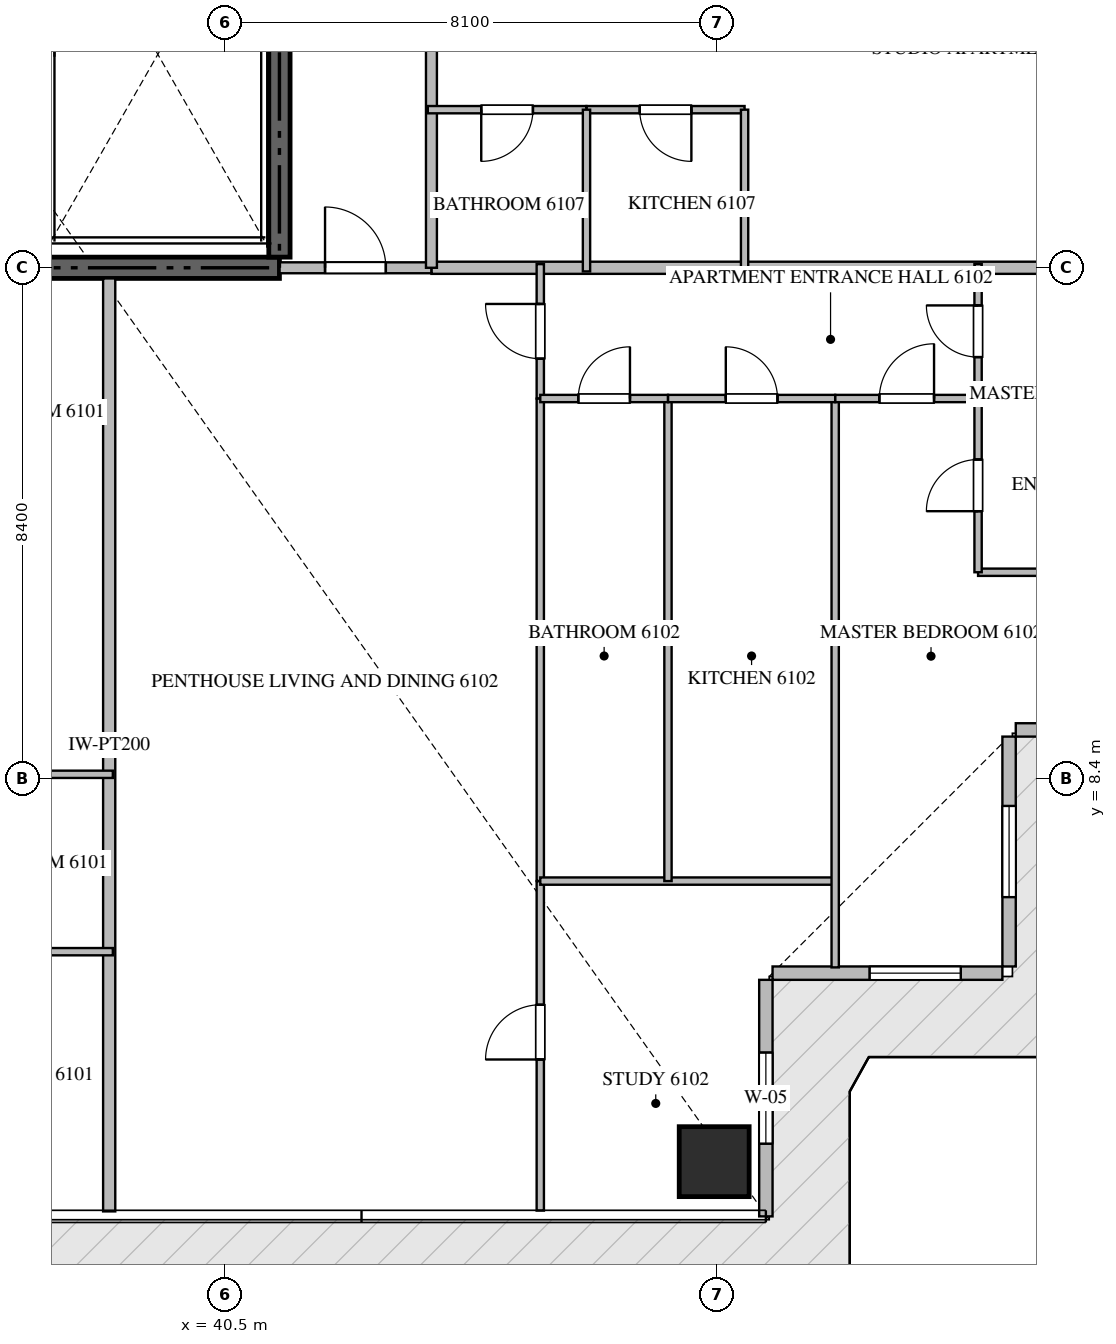
"""IFC4 building model, lengths in metres.
Left out: names, types, materials, properties, quantities, classifications, styles, units other than length and angle.
Written with IfcOpenShell. Run it as: python <this file> out.ifc"""

import sys

from ifc_helpers import new_model, si_unit, direction, frame, frame_2d, origin, origin_2d, place, context, subcontext, project, spatial, rectangle, extrude, source, transform, mapped, element, fill, save


model = new_model("IFC4")
c1 = context("Model", 3, precision=1e-05, world=origin(), true_north=direction((0.0, 1.0)))
c2 = subcontext(c1, "Body", "Model", "MODEL_VIEW")
j1 = project(units=[si_unit("LENGTHUNIT", "METRE"), si_unit("PLANEANGLEUNIT", "RADIAN")], contexts=[c1])
p1 = place(None, origin())
s1 = spatial("IfcSite", under=j1, at=p1, CompositionType="ELEMENT")
p2 = place(p1, origin())
s2 = spatial("IfcBuilding", under=s1, at=p2, CompositionType="ELEMENT")
p3 = place(p2, frame((0.0, 0.0, 245.1)))
s3 = spatial("IfcBuildingStorey", under=s2, at=p3, CompositionType="ELEMENT", Elevation=245.1)
p4 = place(p3, frame((23.4, 16.8, -0.26), z_axis=(0.0, 0.0, 1.0), x_axis=(1.0, 0.0, 0.0)))
e1 = element("IfcWall", 1, at=p4, inside=s3, PredefinedType="SHEAR", context=c2, shape_type="SweptSolid", body=[
    extrude(rectangle(XDim=18.0, YDim=0.35, at=frame_2d((9.0, 0.0))), origin(), (0.0, 0.0, 1.0), 3.848),
])
p5 = place(p3, frame((41.4, 16.975, -0.26), z_axis=(0.0, 0.0, 1.0), x_axis=(0.0, 1.0, 0.0)))
e2 = element("IfcWall", 2, at=p5, inside=s3, PredefinedType="SHEAR", context=c2, shape_type="SweptSolid", body=[
    extrude(rectangle(XDim=8.375, YDim=0.35, at=frame_2d((4.188, 0.0))), origin(), (0.0, 0.0, 1.0), 3.848),
])
m1 = source(origin(), c2, "Body", "SweptSolid", [
    extrude(rectangle(XDim=1.15, YDim=1.15, at=origin_2d()), origin(), (0.0, 0.0, 1.0), 3.85),
])
p6 = place(p3, frame((48.55, 2.1, -0.26), z_axis=(0.0, 0.0, 1.0), x_axis=(1.0, 0.0, 0.0)))
e3 = element("IfcColumn", 3, at=p6, inside=s3, PredefinedType="COLUMN", context=c2, shape_type="MappedRepresentation", body=[
    mapped(m1, transform((0.0, 0.0, 0.0), scale=1.0)),
])
p7 = place(p3, frame((49.4, 1.2, 0.0), z_axis=(0.0, 0.0, 1.0), x_axis=(0.0, 1.0, 0.0)))
e4 = element("IfcWall", 4, at=p7, inside=s3, PredefinedType="ELEMENTEDWALL", context=c2, shape_type="SweptSolid", body=[
    extrude(rectangle(XDim=3.89, YDim=0.22, at=frame_2d((1.945, 0.0))), origin(), (0.0, 0.0, 1.0), 3.575),
])
p8 = place(p7, frame((1.195, 0.0, 0.65)))
e5 = element("IfcOpeningElement", 5, at=p8, cuts=e4, PredefinedType="OPENING", context=c2, shape_type="SweptSolid", body=[
    extrude(rectangle(XDim=1.5, YDim=2.25, at=frame_2d((0.75, 1.125))), frame((0.0, 0.12, 0.0), z_axis=(0.0, -1.0, 0.0), x_axis=(1.0, 0.0, 0.0)), (0.0, 0.0, 1.0), 0.24),
])
p9 = place(p3, frame((49.51, 5.2, 0.0), z_axis=(0.0, 0.0, 1.0), x_axis=(1.0, 0.0, 0.0)))
e6 = element("IfcWall", 6, at=p9, inside=s3, PredefinedType="ELEMENTEDWALL", context=c2, shape_type="SweptSolid", body=[
    extrude(rectangle(XDim=3.78, YDim=0.22, at=frame_2d((1.89, 0.0))), origin(), (0.0, 0.0, 1.0), 3.575),
])
p10 = place(p9, frame((1.596, 0.0, 0.65)))
e7 = element("IfcOpeningElement", 7, at=p10, cuts=e6, PredefinedType="OPENING", context=c2, shape_type="SweptSolid", body=[
    extrude(rectangle(XDim=1.5, YDim=2.25, at=frame_2d((0.75, 1.125))), frame((0.0, 0.12, 0.0), z_axis=(0.0, -1.0, 0.0), x_axis=(1.0, 0.0, 0.0)), (0.0, 0.0, 1.0), 0.24),
])
p11 = place(p3, frame((53.4, 5.31, 0.0), z_axis=(0.0, 0.0, 1.0), x_axis=(0.0, 1.0, 0.0)))
e8 = element("IfcWall", 8, at=p11, inside=s3, PredefinedType="ELEMENTEDWALL", context=c2, shape_type="SweptSolid", body=[
    extrude(rectangle(XDim=3.78, YDim=0.22, at=frame_2d((1.89, 0.0))), origin(), (0.0, 0.0, 1.0), 3.575),
])
p12 = place(p11, frame((1.14, 0.0, 0.65)))
e9 = element("IfcOpeningElement", 9, at=p12, cuts=e8, PredefinedType="OPENING", context=c2, shape_type="SweptSolid", body=[
    extrude(rectangle(XDim=1.5, YDim=2.25, at=frame_2d((0.75, 1.125))), frame((0.0, 0.12, 0.0), z_axis=(0.0, -1.0, 0.0), x_axis=(1.0, 0.0, 0.0)), (0.0, 0.0, 1.0), 0.24),
])
p13 = place(p3, frame((53.51, 9.2, 0.0), z_axis=(0.0, 0.0, 1.0), x_axis=(1.0, 0.0, 0.0)))
e10 = element("IfcWall", 10, at=p13, inside=s3, PredefinedType="ELEMENTEDWALL", context=c2, shape_type="SweptSolid", body=[
    extrude(rectangle(XDim=3.89, YDim=0.22, at=frame_2d((1.945, 0.0))), origin(), (0.0, 0.0, 1.0), 3.575),
])
p14 = place(p13, frame((1.195, 0.0, 0.65)))
e11 = element("IfcOpeningElement", 11, at=p14, cuts=e10, PredefinedType="OPENING", context=c2, shape_type="SweptSolid", body=[
    extrude(rectangle(XDim=1.5, YDim=2.25, at=frame_2d((0.75, 1.125))), frame((0.0, 0.12, 0.0), z_axis=(0.0, -1.0, 0.0), x_axis=(1.0, 0.0, 0.0)), (0.0, 0.0, 1.0), 0.24),
])
p15 = place(p3, frame((38.6, 1.282, 0.0), z_axis=(0.0, 0.0, 1.0), x_axis=(0.0, 1.0, 0.0)))
e12 = element("IfcWall", 12, at=p15, inside=s3, PredefinedType="PARTITIONING", context=c2, shape_type="SweptSolid", body=[
    extrude(rectangle(XDim=15.343, YDim=0.2, at=frame_2d((7.671, 0.0))), origin(), (0.0, 0.0, 1.0), 3.59),
])
p16 = place(p3, frame((43.9, 16.8, 0.0), z_axis=(0.0, 0.0, 1.0), x_axis=(1.0, 0.0, 0.0)))
e13 = element("IfcWall", 13, at=p16, inside=s3, PredefinedType="PARTITIONING", context=c2, shape_type="SweptSolid", body=[
    extrude(rectangle(XDim=13.418, YDim=0.2, at=frame_2d((6.709, 0.0))), origin(), (0.0, 0.0, 1.0), 3.59),
])
p17 = place(p3, frame((41.402, 16.8, 0.0), z_axis=(0.0, 0.0, 1.0), x_axis=(1.0, 0.0, 0.0)))
e14 = element("IfcWall", 14, at=p17, inside=s3, PredefinedType="PARTITIONING", context=c2, shape_type="SweptSolid", body=[
    extrude(rectangle(XDim=2.496, YDim=0.18, at=frame_2d((1.248, 0.0))), origin(), (0.0, 0.0, 1.0), 3.59),
])
p18 = place(p17, frame((0.748, 0.0, 0.0)))
e15 = element("IfcOpeningElement", 15, at=p18, cuts=e14, PredefinedType="OPENING", context=c2, shape_type="SweptSolid", body=[
    extrude(rectangle(XDim=1.0, YDim=2.15, at=frame_2d((0.5, 1.075))), frame((0.0, 0.1, 0.0), z_axis=(0.0, -1.0, 0.0), x_axis=(1.0, 0.0, 0.0)), (0.0, 0.0, 1.0), 0.2),
])
p19 = place(p3, frame((43.9, 16.8, 0.0), z_axis=(0.0, 0.0, 1.0), x_axis=(0.0, 1.0, 0.0)))
e16 = element("IfcWall", 16, at=p19, inside=s3, PredefinedType="PARTITIONING", context=c2, shape_type="SweptSolid", body=[
    extrude(rectangle(XDim=16.8, YDim=0.18, at=frame_2d((8.4, 0.0))), origin(), (0.0, 0.0, 1.0), 3.59),
])
p20 = place(p19, frame((4.503, 0.0, 0.0)))
e17 = element("IfcOpeningElement", 17, at=p20, cuts=e16, PredefinedType="OPENING", context=c2, shape_type="SweptSolid", body=[
    extrude(rectangle(XDim=1.0, YDim=2.15, at=frame_2d((0.5, 1.075))), frame((0.0, 0.1, 0.0), z_axis=(0.0, -1.0, 0.0), x_axis=(1.0, 0.0, 0.0)), (0.0, 0.0, 1.0), 0.2),
])
p21 = place(p19, frame((8.706, 0.0, 0.0)))
e18 = element("IfcOpeningElement", 18, at=p21, cuts=e16, PredefinedType="OPENING", context=c2, shape_type="SweptSolid", body=[
    extrude(rectangle(XDim=1.0, YDim=2.15, at=frame_2d((0.5, 1.075))), frame((0.0, 0.1, 0.0), z_axis=(0.0, -1.0, 0.0), x_axis=(1.0, 0.0, 0.0)), (0.0, 0.0, 1.0), 0.2),
])
for number, where, z_axis, x_axis in (
    (19, (33.8, 5.553, 0.0), (0.0, 0.0, 1.0), (1.0, 0.0, 0.0)),
    (20, (33.8, 8.47, 0.0), (0.0, 0.0, 1.0), (1.0, 0.0, 0.0)),
):
    element("IfcWall", number, at=place(p3, frame(where, z_axis=z_axis, x_axis=x_axis)), inside=s3, PredefinedType="PARTITIONING", context=c2, shape_type="SweptSolid", body=[
        extrude(rectangle(XDim=4.86, YDim=0.12, at=frame_2d((2.43, 0.0))), origin(), (0.0, 0.0, 1.0), 3.59),
    ])
p22 = place(p3, frame((45.69, 14.65, 0.0), z_axis=(0.0, 0.0, 1.0), x_axis=(0.0, 1.0, 0.0)))
e21 = element("IfcWall", 21, at=p22, inside=s3, PredefinedType="PARTITIONING", context=c2, shape_type="SweptSolid", body=[
    extrude(rectangle(XDim=2.21, YDim=0.12, at=frame_2d((1.105, 0.0))), origin(), (0.0, 0.0, 1.0), 3.59),
])
p23 = place(p22, frame((0.655, 0.0, 0.0)))
e22 = element("IfcOpeningElement", 22, at=p23, cuts=e21, PredefinedType="OPENING", context=c2, shape_type="SweptSolid", body=[
    extrude(rectangle(XDim=0.9, YDim=2.1, at=frame_2d((0.45, 1.05))), frame((0.0, 0.07, 0.0), z_axis=(0.0, -1.0, 0.0), x_axis=(1.0, 0.0, 0.0)), (0.0, 0.0, 1.0), 0.14),
])
p24 = place(p3, frame((45.69, 1.295, 0.0), z_axis=(0.0, 0.0, 1.0), x_axis=(0.0, 1.0, 0.0)))
e23 = element("IfcWall", 23, at=p24, inside=s3, PredefinedType="PARTITIONING", context=c2, shape_type="SweptSolid", body=[
    extrude(rectangle(XDim=5.419, YDim=0.12, at=frame_2d((2.709, 0.0))), origin(), (0.0, 0.0, 1.0), 3.59),
])
p25 = place(p24, frame((2.485, 0.0, 0.0)))
e24 = element("IfcOpeningElement", 24, at=p25, cuts=e23, PredefinedType="OPENING", context=c2, shape_type="SweptSolid", body=[
    extrude(rectangle(XDim=0.9, YDim=2.1, at=frame_2d((0.45, 1.05))), frame((0.0, 0.07, 0.0), z_axis=(0.0, -1.0, 0.0), x_axis=(1.0, 0.0, 0.0)), (0.0, 0.0, 1.0), 0.14),
])
p26 = place(p3, frame((45.69, 6.716, 0.0), z_axis=(0.0, 0.0, 1.0), x_axis=(0.0, 1.0, 0.0)))
e25 = element("IfcWall", 25, at=p26, inside=s3, PredefinedType="PARTITIONING", context=c2, shape_type="SweptSolid", body=[
    extrude(rectangle(XDim=7.932, YDim=0.12, at=frame_2d((3.966, 0.0))), origin(), (0.0, 0.0, 1.0), 3.59),
])
p27 = place(p3, frame((45.69, 6.714, 0.0), z_axis=(0.0, 0.0, 1.0), x_axis=(1.0, 0.0, 0.0)))
e26 = element("IfcWall", 26, at=p27, inside=s3, PredefinedType="PARTITIONING", context=c2, shape_type="SweptSolid", body=[
    extrude(rectangle(XDim=4.85, YDim=0.12, at=frame_2d((2.425, 0.0))), origin(), (0.0, 0.0, 1.0), 3.59),
])
p28 = place(p3, frame((50.54, 5.295, 0.0), z_axis=(0.0, 0.0, 1.0), x_axis=(0.0, 1.0, 0.0)))
e27 = element("IfcWall", 27, at=p28, inside=s3, PredefinedType="PARTITIONING", context=c2, shape_type="SweptSolid", body=[
    extrude(rectangle(XDim=9.355, YDim=0.12, at=frame_2d((4.677, 0.0))), origin(), (0.0, 0.0, 1.0), 3.59),
])
p29 = place(p3, frame((47.79, 6.714, 0.0), z_axis=(0.0, 0.0, 1.0), x_axis=(0.0, 1.0, 0.0)))
e28 = element("IfcWall", 28, at=p29, inside=s3, PredefinedType="PARTITIONING", context=c2, shape_type="SweptSolid", body=[
    extrude(rectangle(XDim=7.936, YDim=0.12, at=frame_2d((3.968, 0.0))), origin(), (0.0, 0.0, 1.0), 3.59),
])
p30 = place(p3, frame((45.69, 14.65, 0.0), z_axis=(0.0, 0.0, 1.0), x_axis=(1.0, 0.0, 0.0)))
e29 = element("IfcWall", 29, at=p30, inside=s3, PredefinedType="PARTITIONING", context=c2, shape_type="SweptSolid", body=[
    extrude(rectangle(XDim=2.1, YDim=0.12, at=frame_2d((1.05, 0.0))), origin(), (0.0, 0.0, 1.0), 3.59),
])
p31 = place(p30, frame((0.625, 0.0, 0.0)))
e30 = element("IfcOpeningElement", 30, at=p31, cuts=e29, PredefinedType="OPENING", context=c2, shape_type="SweptSolid", body=[
    extrude(rectangle(XDim=0.85, YDim=2.1, at=frame_2d((0.425, 1.05))), frame((0.0, 0.07, 0.0), z_axis=(0.0, -1.0, 0.0), x_axis=(1.0, 0.0, 0.0)), (0.0, 0.0, 1.0), 0.14),
])
p32 = place(p3, frame((47.792, 14.65, 0.0), z_axis=(0.0, 0.0, 1.0), x_axis=(1.0, 0.0, 0.0)))
e31 = element("IfcWall", 31, at=p32, inside=s3, PredefinedType="PARTITIONING", context=c2, shape_type="SweptSolid", body=[
    extrude(rectangle(XDim=2.748, YDim=0.12, at=frame_2d((1.374, 0.0))), origin(), (0.0, 0.0, 1.0), 3.59),
])
p33 = place(p32, frame((0.949, 0.0, 0.0)))
e32 = element("IfcOpeningElement", 32, at=p33, cuts=e31, PredefinedType="OPENING", context=c2, shape_type="SweptSolid", body=[
    extrude(rectangle(XDim=0.85, YDim=2.1, at=frame_2d((0.425, 1.05))), frame((0.0, 0.07, 0.0), z_axis=(0.0, -1.0, 0.0), x_axis=(1.0, 0.0, 0.0)), (0.0, 0.0, 1.0), 0.14),
])
p34 = place(p3, frame((50.542, 14.65, 0.0), z_axis=(0.0, 0.0, 1.0), x_axis=(1.0, 0.0, 0.0)))
e33 = element("IfcWall", 33, at=p34, inside=s3, PredefinedType="PARTITIONING", context=c2, shape_type="SweptSolid", body=[
    extrude(rectangle(XDim=2.348, YDim=0.12, at=frame_2d((1.174, 0.0))), origin(), (0.0, 0.0, 1.0), 3.59),
])
p35 = place(p34, frame((0.724, 0.0, 0.0)))
e34 = element("IfcOpeningElement", 34, at=p35, cuts=e33, PredefinedType="OPENING", context=c2, shape_type="SweptSolid", body=[
    extrude(rectangle(XDim=0.9, YDim=2.1, at=frame_2d((0.45, 1.05))), frame((0.0, 0.07, 0.0), z_axis=(0.0, -1.0, 0.0), x_axis=(1.0, 0.0, 0.0)), (0.0, 0.0, 1.0), 0.14),
])
p36 = place(p3, frame((52.89, 11.793, 0.0), z_axis=(0.0, 0.0, 1.0), x_axis=(1.0, 0.0, 0.0)))
e35 = element("IfcWall", 35, at=p36, inside=s3, PredefinedType="PARTITIONING", context=c2, shape_type="SweptSolid", body=[
    extrude(rectangle(XDim=4.415, YDim=0.12, at=frame_2d((2.208, 0.0))), origin(), (0.0, 0.0, 1.0), 3.59),
])
p37 = place(p3, frame((52.892, 14.65, 0.0), z_axis=(0.0, 0.0, 1.0), x_axis=(1.0, 0.0, 0.0)))
e36 = element("IfcWall", 36, at=p37, inside=s3, PredefinedType="PARTITIONING", context=c2, shape_type="SweptSolid", body=[
    extrude(rectangle(XDim=4.413, YDim=0.12, at=frame_2d((2.207, 0.0))), origin(), (0.0, 0.0, 1.0), 3.59),
])
p38 = place(p3, frame((52.89, 11.793, 0.0), z_axis=(0.0, 0.0, 1.0), x_axis=(0.0, 1.0, 0.0)))
e37 = element("IfcWall", 37, at=p38, inside=s3, PredefinedType="PARTITIONING", context=c2, shape_type="SweptSolid", body=[
    extrude(rectangle(XDim=2.857, YDim=0.12, at=frame_2d((1.428, 0.0))), origin(), (0.0, 0.0, 1.0), 3.59),
])
p39 = place(p38, frame((1.004, 0.0, 0.0)))
e38 = element("IfcOpeningElement", 38, at=p39, cuts=e37, PredefinedType="OPENING", context=c2, shape_type="SweptSolid", body=[
    extrude(rectangle(XDim=0.85, YDim=2.1, at=frame_2d((0.425, 1.05))), frame((0.0, 0.07, 0.0), z_axis=(0.0, -1.0, 0.0), x_axis=(1.0, 0.0, 0.0)), (0.0, 0.0, 1.0), 0.14),
])
p40 = place(p3, frame((52.89, 14.652, 0.0), z_axis=(0.0, 0.0, 1.0), x_axis=(0.0, 1.0, 0.0)))
e39 = element("IfcWall", 39, at=p40, inside=s3, PredefinedType="PARTITIONING", context=c2, shape_type="SweptSolid", body=[
    extrude(rectangle(XDim=2.208, YDim=0.12, at=frame_2d((1.104, 0.0))), origin(), (0.0, 0.0, 1.0), 3.59),
])
p41 = place(p40, frame((0.679, 0.0, 0.0)))
e40 = element("IfcOpeningElement", 40, at=p41, cuts=e39, PredefinedType="OPENING", context=c2, shape_type="SweptSolid", body=[
    extrude(rectangle(XDim=0.85, YDim=2.1, at=frame_2d((0.425, 1.05))), frame((0.0, 0.07, 0.0), z_axis=(0.0, -1.0, 0.0), x_axis=(1.0, 0.0, 0.0)), (0.0, 0.0, 1.0), 0.14),
])
p42 = place(p3, frame((49.05, 19.4, 0.0), z_axis=(0.0, 0.0, 1.0), x_axis=(-1.0, 0.0, 0.0)))
e41 = element("IfcWall", 41, at=p42, inside=s3, PredefinedType="PARTITIONING", context=c2, shape_type="SweptSolid", body=[
    extrude(rectangle(XDim=2.6, YDim=0.12, at=frame_2d((1.3, 0.0))), origin(), (0.0, 0.0, 1.0), 3.59),
])
p43 = place(p42, frame((0.875, 0.0, 0.0)))
e42 = element("IfcOpeningElement", 42, at=p43, cuts=e41, PredefinedType="OPENING", context=c2, shape_type="SweptSolid", body=[
    extrude(rectangle(XDim=0.85, YDim=2.1, at=frame_2d((0.425, 1.05))), frame((0.0, 0.07, 0.0), z_axis=(0.0, -1.0, 0.0), x_axis=(1.0, 0.0, 0.0)), (0.0, 0.0, 1.0), 0.14),
])
p44 = place(p3, frame((46.448, 19.4, 0.0), z_axis=(0.0, 0.0, 1.0), x_axis=(-1.0, 0.0, 0.0)))
e43 = element("IfcWall", 43, at=p44, inside=s3, PredefinedType="PARTITIONING", context=c2, shape_type="SweptSolid", body=[
    extrude(rectangle(XDim=2.608, YDim=0.12, at=frame_2d((1.304, 0.0))), origin(), (0.0, 0.0, 1.0), 3.59),
])
p45 = place(p44, frame((0.879, 0.0, 0.0)))
e44 = element("IfcOpeningElement", 44, at=p45, cuts=e43, PredefinedType="OPENING", context=c2, shape_type="SweptSolid", body=[
    extrude(rectangle(XDim=0.85, YDim=2.1, at=frame_2d((0.425, 1.05))), frame((0.0, 0.07, 0.0), z_axis=(0.0, -1.0, 0.0), x_axis=(1.0, 0.0, 0.0)), (0.0, 0.0, 1.0), 0.14),
])
for number, where, z_axis, x_axis in (
    (45, (46.45, 16.74, 0.0), (0.0, 0.0, 1.0), (0.0, 1.0, 0.0)),
    (46, (49.05, 16.74, 0.0), (0.0, 0.0, 1.0), (0.0, 1.0, 0.0)),
):
    element("IfcWall", number, at=place(p3, frame(where, z_axis=z_axis, x_axis=x_axis)), inside=s3, PredefinedType="PARTITIONING", context=c2, shape_type="SweptSolid", body=[
        extrude(rectangle(XDim=2.66, YDim=0.12, at=frame_2d((1.33, 0.0))), origin(), (0.0, 0.0, 1.0), 3.59),
    ])
m2 = source(origin(), c2, "Body", "SweptSolid", [
    extrude(rectangle(XDim=1.5, YDim=2.25, at=frame_2d((0.75, 1.125))), frame((0.0, 0.03, 0.0), z_axis=(0.0, -1.0, 0.0), x_axis=(1.0, 0.0, 0.0)), (0.0, 0.0, 1.0), 0.06),
])
p46 = place(p8, origin())
e47 = element("IfcWindow", 47, at=p46, inside=s3, PartitioningType="SINGLE_PANEL", PredefinedType="WINDOW", context=c2, shape_type="MappedRepresentation", body=[
    mapped(m2, transform((0.0, 0.0, 0.0), scale=1.0)),
])
fill(e5, e47)
p47 = place(p10, origin())
e48 = element("IfcWindow", 48, at=p47, inside=s3, PartitioningType="SINGLE_PANEL", PredefinedType="WINDOW", context=c2, shape_type="MappedRepresentation", body=[
    mapped(m2, transform((0.0, 0.0, 0.0), scale=1.0)),
])
fill(e7, e48)
p48 = place(p12, origin())
e49 = element("IfcWindow", 49, at=p48, inside=s3, PartitioningType="SINGLE_PANEL", PredefinedType="WINDOW", context=c2, shape_type="MappedRepresentation", body=[
    mapped(m2, transform((0.0, 0.0, 0.0), scale=1.0)),
])
fill(e9, e49)
m3 = source(origin(), c2, "Body", "SweptSolid", [
    extrude(rectangle(XDim=1.0, YDim=2.15, at=frame_2d((0.5, 1.075))), frame((0.0, 0.025, 0.0), z_axis=(0.0, -1.0, 0.0), x_axis=(1.0, 0.0, 0.0)), (0.0, 0.0, 1.0), 0.05),
])
p49 = place(p18, origin())
e50 = element("IfcDoor", 50, at=p49, inside=s3, OperationType="SINGLE_SWING_LEFT", PredefinedType="DOOR", context=c2, shape_type="MappedRepresentation", body=[
    mapped(m3, transform((0.0, 0.0, 0.0), scale=1.0)),
])
fill(e15, e50)
m4 = source(origin(), c2, "Body", "SweptSolid", [
    extrude(rectangle(XDim=0.9, YDim=2.1, at=frame_2d((0.45, 1.05))), frame((0.0, 0.025, 0.0), z_axis=(0.0, -1.0, 0.0), x_axis=(1.0, 0.0, 0.0)), (0.0, 0.0, 1.0), 0.05),
])
p50 = place(p23, origin())
e51 = element("IfcDoor", 51, at=p50, inside=s3, OperationType="SINGLE_SWING_RIGHT", PredefinedType="DOOR", context=c2, shape_type="MappedRepresentation", body=[
    mapped(m4, transform((0.0, 0.0, 0.0), scale=1.0)),
])
fill(e22, e51)
p51 = place(p25, origin())
e52 = element("IfcDoor", 52, at=p51, inside=s3, OperationType="SINGLE_SWING_LEFT", PredefinedType="DOOR", context=c2, shape_type="MappedRepresentation", body=[
    mapped(m4, transform((0.0, 0.0, 0.0), scale=1.0)),
])
fill(e24, e52)
m5 = source(origin(), c2, "Body", "SweptSolid", [
    extrude(rectangle(XDim=0.85, YDim=2.1, at=frame_2d((0.425, 1.05))), frame((0.0, 0.025, 0.0), z_axis=(0.0, -1.0, 0.0), x_axis=(1.0, 0.0, 0.0)), (0.0, 0.0, 1.0), 0.05),
])
p52 = place(p31, origin())
e53 = element("IfcDoor", 53, at=p52, inside=s3, OperationType="SINGLE_SWING_RIGHT", PredefinedType="DOOR", context=c2, shape_type="MappedRepresentation", body=[
    mapped(m5, transform((0.0, 0.0, 0.0), scale=1.0)),
])
fill(e30, e53)
p53 = place(p33, origin())
e54 = element("IfcDoor", 54, at=p53, inside=s3, OperationType="SINGLE_SWING_LEFT", PredefinedType="DOOR", context=c2, shape_type="MappedRepresentation", body=[
    mapped(m5, transform((0.0, 0.0, 0.0), scale=1.0)),
])
fill(e32, e54)
p54 = place(p35, origin())
e55 = element("IfcDoor", 55, at=p54, inside=s3, OperationType="SINGLE_SWING_RIGHT", PredefinedType="DOOR", context=c2, shape_type="MappedRepresentation", body=[
    mapped(m4, transform((0.0, 0.0, 0.0), scale=1.0)),
])
fill(e34, e55)
p55 = place(p39, origin())
e56 = element("IfcDoor", 56, at=p55, inside=s3, OperationType="SINGLE_SWING_LEFT", PredefinedType="DOOR", context=c2, shape_type="MappedRepresentation", body=[
    mapped(m5, transform((0.0, 0.0, 0.0), scale=1.0)),
])
fill(e38, e56)
p56 = place(p41, origin())
e57 = element("IfcDoor", 57, at=p56, inside=s3, OperationType="SINGLE_SWING_RIGHT", PredefinedType="DOOR", context=c2, shape_type="MappedRepresentation", body=[
    mapped(m5, transform((0.0, 0.0, 0.0), scale=1.0)),
])
fill(e40, e57)
p57 = place(p43, origin())
e58 = element("IfcDoor", 58, at=p57, inside=s3, OperationType="SINGLE_SWING_LEFT", PredefinedType="DOOR", context=c2, shape_type="MappedRepresentation", body=[
    mapped(m5, transform((0.0, 0.0, 0.0), scale=1.0)),
])
fill(e42, e58)
p58 = place(p45, origin())
e59 = element("IfcDoor", 59, at=p58, inside=s3, OperationType="SINGLE_SWING_RIGHT", PredefinedType="DOOR", context=c2, shape_type="MappedRepresentation", body=[
    mapped(m5, transform((0.0, 0.0, 0.0), scale=1.0)),
])
fill(e44, e59)
save(model, sys.argv[1])
